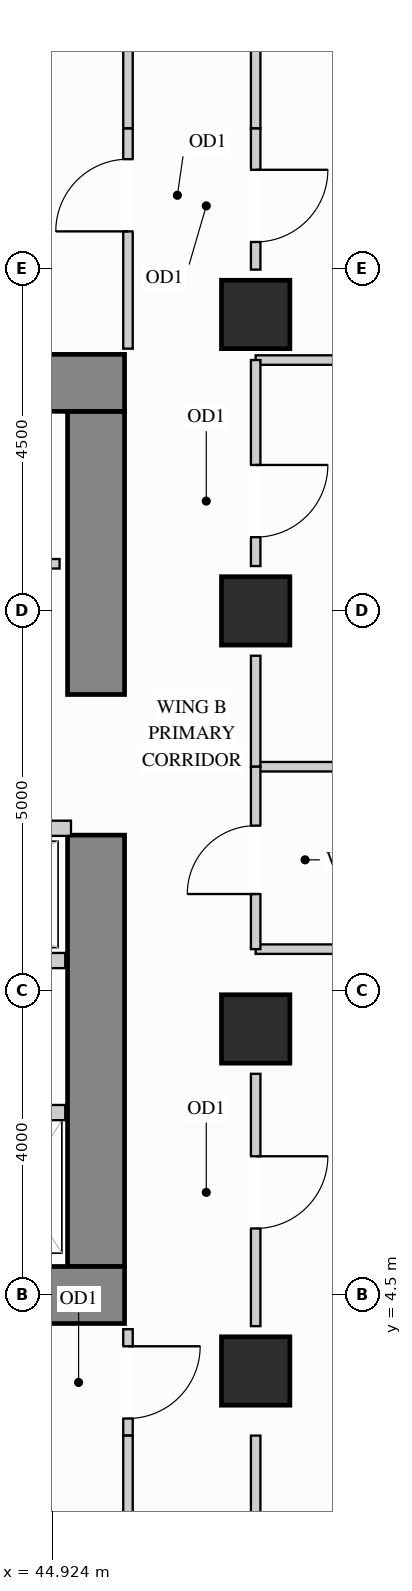
"""IFC4 building model, lengths in metres.
Left out: names, types, materials, properties, quantities, classifications, styles, units other than length and angle.
Written with IfcOpenShell. Run it as: python <this file> out.ifc"""

import sys

from ifc_helpers import new_model, si_unit, direction, frame, frame_2d, origin, origin_2d, place, context, subcontext, project, spatial, rectangle, extrude, source, transform, mapped, element, fill, save


model = new_model("IFC4")
c1 = context("Model", 3, precision=1e-05, world=origin(), true_north=direction((0.0, 1.0)))
c2 = subcontext(c1, "Body", "Model", "MODEL_VIEW")
j1 = project(units=[si_unit("LENGTHUNIT", "METRE"), si_unit("PLANEANGLEUNIT", "RADIAN")], contexts=[c1])
p1 = place(None, origin())
s1 = spatial("IfcSite", under=j1, at=p1, CompositionType="ELEMENT")
p2 = place(p1, origin())
s2 = spatial("IfcBuilding", under=s1, at=p2, CompositionType="ELEMENT")
p3 = place(p2, frame((0.0, 0.0, 124.2)))
s3 = spatial("IfcBuildingStorey", under=s2, at=p3, CompositionType="ELEMENT", Elevation=124.2)
m1 = source(origin(), c2, "Body", "SweptSolid", [
    extrude(rectangle(XDim=0.9, YDim=0.9, at=origin_2d()), origin(), (0.0, 0.0, 1.0), 3.38),
])
for number, where, z_axis, x_axis in (
    (1, (47.6, 13.5, 0.0), (0.0, 0.0, 1.0), (1.0, 0.0, 0.0)),
    (2, (47.6, 3.5, 0.0), (0.0, 0.0, 1.0), (1.0, 0.0, 0.0)),
    (3, (47.6, 8.0, 0.0), (0.0, 0.0, 1.0), (1.0, 0.0, 0.0)),
    (4, (47.6, 17.4, 0.0), (0.0, 0.0, 1.0), (1.0, 0.0, 0.0)),
):
    element("IfcColumn", number, at=place(p3, frame(where, z_axis=z_axis, x_axis=x_axis)), inside=s3, PredefinedType="COLUMN", context=c2, shape_type="MappedRepresentation", body=[
        mapped(m1, transform((0.0, 0.0, 0.0), x_axis=(1.0, 0.0, 0.0), y_axis=(0.0, 1.0, 0.0), z_axis=(0.0, 0.0, 1.0))),
    ])
m2 = source(origin(), c2, "Body", "SweptSolid", [
    extrude(rectangle(XDim=5.675, YDim=0.75, at=frame_2d((2.837, 0.0))), origin(), (0.0, 0.0, 1.0), 3.38),
])
p4 = place(p3, frame((45.5, 4.875, 0.0), z_axis=(0.0, 0.0, 1.0), x_axis=(0.0, 1.0, 0.0)))
e5 = element("IfcWall", 5, at=p4, inside=s3, PredefinedType="SHEAR", context=c2, shape_type="MappedRepresentation", body=[
    mapped(m2, transform((0.0, 0.0, 0.0), x_axis=(1.0, 0.0, 0.0), y_axis=(0.0, 1.0, 0.0), z_axis=(0.0, 0.0, 1.0))),
])
m3 = source(origin(), c2, "Body", "SweptSolid", [
    extrude(rectangle(XDim=3.725, YDim=0.75, at=frame_2d((1.863, 0.0))), origin(), (0.0, 0.0, 1.0), 3.38),
])
p5 = place(p3, frame((45.5, 12.4, 0.0), z_axis=(0.0, 0.0, 1.0), x_axis=(0.0, 1.0, 0.0)))
e6 = element("IfcWall", 6, at=p5, inside=s3, PredefinedType="SHEAR", context=c2, shape_type="MappedRepresentation", body=[
    mapped(m3, transform((0.0, 0.0, 0.0), x_axis=(1.0, 0.0, 0.0), y_axis=(0.0, 1.0, 0.0), z_axis=(0.0, 0.0, 1.0))),
])
m4 = source(origin(), c2, "Body", "SweptSolid", [
    extrude(rectangle(XDim=10.25, YDim=0.75, at=frame_2d((5.125, 0.0))), origin(), (0.0, 0.0, 1.0), 3.38),
])
for number, where, z_axis, x_axis in (
    (7, (35.625, 16.5, 0.0), (0.0, 0.0, 1.0), (1.0, 0.0, 0.0)),
    (8, (35.625, 4.5, 0.0), (0.0, 0.0, 1.0), (1.0, 0.0, 0.0)),
):
    element("IfcWall", number, at=place(p3, frame(where, z_axis=z_axis, x_axis=x_axis)), inside=s3, PredefinedType="SHEAR", context=c2, shape_type="MappedRepresentation", body=[
        mapped(m4, transform((0.0, 0.0, 0.0), x_axis=(1.0, 0.0, 0.0), y_axis=(0.0, 1.0, 0.0), z_axis=(0.0, 0.0, 1.0))),
    ])
p6 = place(p3, frame((36.5, 14.12, 0.0), z_axis=(0.0, 0.0, 1.0), x_axis=(1.0, 0.0, 0.0)))
e9 = element("IfcWall", 9, at=p6, inside=s3, PredefinedType="PARTITIONING", context=c2, shape_type="SweptSolid", body=[
    extrude(rectangle(XDim=8.52, YDim=0.125, at=frame_2d((4.26, 0.0))), origin(), (0.0, 0.0, 1.0), 3.365),
])
p7 = place(p6, frame((3.785, 0.0, 0.0)))
e10 = element("IfcOpeningElement", 10, at=p7, cuts=e9, PredefinedType="OPENING", context=c2, shape_type="SweptSolid", body=[
    extrude(rectangle(XDim=0.95, YDim=2.15, at=frame_2d((0.475, 1.075))), frame((0.0, 0.073, 0.0), z_axis=(0.0, -1.0, 0.0), x_axis=(1.0, 0.0, 0.0)), (0.0, 0.0, 1.0), 0.145),
])
m5 = source(origin(), c2, "Body", "SweptSolid", [
    extrude(rectangle(XDim=8.048, YDim=0.125, at=frame_2d((4.024, 0.0))), origin(), (0.0, 0.0, 1.0), 3.365),
])
for number, where, z_axis, x_axis in (
    (11, (47.6, 11.45, 0.0), (0.0, 0.0, 1.0), (1.0, 0.0, 0.0)),
    (12, (47.6, 16.8, 0.0), (0.0, 0.0, 1.0), (1.0, 0.0, 0.0)),
    (13, (47.6, 9.05, 0.0), (0.0, 0.0, 1.0), (1.0, 0.0, 0.0)),
):
    element("IfcWall", number, at=place(p3, frame(where, z_axis=z_axis, x_axis=x_axis)), inside=s3, PredefinedType="PARTITIONING", context=c2, shape_type="MappedRepresentation", body=[
        mapped(m5, transform((0.0, 0.0, 0.0), x_axis=(1.0, 0.0, 0.0), y_axis=(0.0, 1.0, 0.0), z_axis=(0.0, 0.0, 1.0))),
    ])
p8 = place(p3, frame((47.6, 4.09, 0.0), z_axis=(0.0, 0.0, 1.0), x_axis=(0.0, 1.0, 0.0)))
e14 = element("IfcWall", 14, at=p8, inside=s3, PredefinedType="PARTITIONING", context=c2, shape_type="SweptSolid", body=[
    extrude(rectangle(XDim=3.32, YDim=0.125, at=frame_2d((1.66, 0.0))), origin(), (0.0, 0.0, 1.0), 2.677),
])
p9 = place(p8, frame((1.285, 0.0, 0.0)))
e15 = element("IfcOpeningElement", 15, at=p9, cuts=e14, PredefinedType="OPENING", context=c2, shape_type="SweptSolid", body=[
    extrude(rectangle(XDim=0.95, YDim=2.15, at=frame_2d((0.475, 1.075))), frame((0.0, 0.073, 0.0), z_axis=(0.0, -1.0, 0.0), x_axis=(1.0, 0.0, 0.0)), (0.0, 0.0, 1.0), 0.145),
])
m6 = source(origin(), c2, "Body", "SweptSolid", [
    extrude(rectangle(XDim=1.46, YDim=0.125, at=frame_2d((0.73, 0.0))), origin(), (0.0, 0.0, 1.0), 2.677),
])
for number, where, z_axis, x_axis in (
    (16, (47.6, 1.19, 0.0), (0.0, 0.0, 1.0), (0.0, 1.0, 0.0)),
    (17, (47.6, 11.45, 0.0), (0.0, 0.0, 1.0), (0.0, 1.0, 0.0)),
):
    element("IfcWall", number, at=place(p3, frame(where, z_axis=z_axis, x_axis=x_axis)), inside=s3, PredefinedType="PARTITIONING", context=c2, shape_type="MappedRepresentation", body=[
        mapped(m6, transform((0.0, 0.0, 0.0), x_axis=(1.0, 0.0, 0.0), y_axis=(0.0, 1.0, 0.0), z_axis=(0.0, 0.0, 1.0))),
    ])
p10 = place(p3, frame((47.6, 14.09, 0.0), z_axis=(0.0, 0.0, 1.0), x_axis=(0.0, 1.0, 0.0)))
e18 = element("IfcWall", 18, at=p10, inside=s3, PredefinedType="PARTITIONING", context=c2, shape_type="SweptSolid", body=[
    extrude(rectangle(XDim=2.71, YDim=0.125, at=frame_2d((1.355, 0.0))), origin(), (0.0, 0.0, 1.0), 2.677),
])
p11 = place(p10, frame((0.38, 0.0, 0.0)))
e19 = element("IfcOpeningElement", 19, at=p11, cuts=e18, PredefinedType="OPENING", context=c2, shape_type="SweptSolid", body=[
    extrude(rectangle(XDim=0.95, YDim=2.15, at=frame_2d((0.475, 1.075))), frame((0.0, 0.073, 0.0), z_axis=(0.0, -1.0, 0.0), x_axis=(1.0, 0.0, 0.0)), (0.0, 0.0, 1.0), 0.145),
])
p12 = place(p3, frame((47.6, 17.99, 0.0), z_axis=(0.0, 0.0, 1.0), x_axis=(0.0, 1.0, 0.0)))
e20 = element("IfcWall", 20, at=p12, inside=s3, PredefinedType="PARTITIONING", context=c2, shape_type="SweptSolid", body=[
    extrude(rectangle(XDim=1.86, YDim=0.125, at=frame_2d((0.93, 0.0))), origin(), (0.0, 0.0, 1.0), 2.677),
])
p13 = place(p12, frame((0.363, 0.0, 0.0)))
e21 = element("IfcOpeningElement", 21, at=p13, cuts=e20, PredefinedType="OPENING", context=c2, shape_type="SweptSolid", body=[
    extrude(rectangle(XDim=0.95, YDim=2.15, at=frame_2d((0.475, 1.075))), frame((0.0, 0.073, 0.0), z_axis=(0.0, -1.0, 0.0), x_axis=(1.0, 0.0, 0.0)), (0.0, 0.0, 1.0), 0.145),
])
p14 = place(p3, frame((47.6, 19.85, 0.0), z_axis=(0.0, 0.0, 1.0), x_axis=(0.0, 1.0, 0.0)))
e22 = element("IfcWall", 22, at=p14, inside=s3, PredefinedType="PARTITIONING", context=c2, shape_type="MappedRepresentation", body=[
    mapped(m6, transform((0.0, 0.0, 0.0), x_axis=(1.0, 0.0, 0.0), y_axis=(0.0, 1.0, 0.0), z_axis=(0.0, 0.0, 1.0))),
])
p15 = place(p3, frame((47.6, 9.05, 0.0), z_axis=(0.0, 0.0, 1.0), x_axis=(0.0, 1.0, 0.0)))
e23 = element("IfcWall", 23, at=p15, inside=s3, PredefinedType="PARTITIONING", context=c2, shape_type="SweptSolid", body=[
    extrude(rectangle(XDim=2.4, YDim=0.125, at=frame_2d((1.2, 0.0))), origin(), (0.0, 0.0, 1.0), 2.677),
])
p16 = place(p15, frame((0.725, 0.0, 0.0)))
e24 = element("IfcOpeningElement", 24, at=p16, cuts=e23, PredefinedType="OPENING", context=c2, shape_type="SweptSolid", body=[
    extrude(rectangle(XDim=0.9, YDim=2.15, at=frame_2d((0.45, 1.075))), frame((0.0, 0.073, 0.0), z_axis=(0.0, -1.0, 0.0), x_axis=(1.0, 0.0, 0.0)), (0.0, 0.0, 1.0), 0.145),
])
p17 = place(p3, frame((45.92, 16.95, 0.0), z_axis=(0.0, 0.0, 1.0), x_axis=(0.0, 1.0, 0.0)))
e25 = element("IfcWall", 25, at=p17, inside=s3, PredefinedType="PARTITIONING", context=c2, shape_type="SweptSolid", body=[
    extrude(rectangle(XDim=2.9, YDim=0.125, at=frame_2d((1.45, 0.0))), origin(), (0.0, 0.0, 1.0), 3.365),
])
p18 = place(p17, frame((1.543, 0.0, 0.0)))
e26 = element("IfcOpeningElement", 26, at=p18, cuts=e25, PredefinedType="OPENING", context=c2, shape_type="SweptSolid", body=[
    extrude(rectangle(XDim=0.95, YDim=2.15, at=frame_2d((0.475, 1.075))), frame((0.0, 0.073, 0.0), z_axis=(0.0, -1.0, 0.0), x_axis=(1.0, 0.0, 0.0)), (0.0, 0.0, 1.0), 0.145),
])
m7 = source(origin(), c2, "Body", "SweptSolid", [
    extrude(rectangle(XDim=2.298, YDim=0.125, at=frame_2d((1.149, 0.0))), origin(), (0.0, 0.0, 1.0), 3.365),
])
p19 = place(p3, frame((45.92, 19.85, 0.0), z_axis=(0.0, 0.0, 1.0), x_axis=(0.0, 1.0, 0.0)))
e27 = element("IfcWall", 27, at=p19, inside=s3, PredefinedType="PARTITIONING", context=c2, shape_type="MappedRepresentation", body=[
    mapped(m7, transform((0.0, 0.0, 0.0), x_axis=(1.0, 0.0, 0.0), y_axis=(0.0, 1.0, 0.0), z_axis=(0.0, 0.0, 1.0))),
])
p20 = place(p3, frame((45.92, 2.65, 0.0), z_axis=(0.0, 0.0, 1.0), x_axis=(0.0, 1.0, 0.0)))
e28 = element("IfcWall", 28, at=p20, inside=s3, PredefinedType="PARTITIONING", context=c2, shape_type="SweptSolid", body=[
    extrude(rectangle(XDim=1.4, YDim=0.125, at=frame_2d((0.7, 0.0))), origin(), (0.0, 0.0, 1.0), 3.365),
])
p21 = place(p20, frame((0.225, 0.0, 0.0)))
e29 = element("IfcOpeningElement", 29, at=p21, cuts=e28, PredefinedType="OPENING", context=c2, shape_type="SweptSolid", body=[
    extrude(rectangle(XDim=0.95, YDim=2.15, at=frame_2d((0.475, 1.075))), frame((0.0, 0.073, 0.0), z_axis=(0.0, -1.0, 0.0), x_axis=(1.0, 0.0, 0.0)), (0.0, 0.0, 1.0), 0.145),
])
p22 = place(p3, frame((45.92, 0.352, 0.0), z_axis=(0.0, 0.0, 1.0), x_axis=(0.0, 1.0, 0.0)))
e30 = element("IfcWall", 30, at=p22, inside=s3, PredefinedType="PARTITIONING", context=c2, shape_type="MappedRepresentation", body=[
    mapped(m7, transform((0.0, 0.0, 0.0), x_axis=(1.0, 0.0, 0.0), y_axis=(0.0, 1.0, 0.0), z_axis=(0.0, 0.0, 1.0))),
])
m8 = source(origin(), c2, "Body", "SweptSolid", [
    extrude(rectangle(XDim=1.245, YDim=0.2, at=frame_2d((0.623, 0.0))), origin(), (0.0, 0.0, 1.0), 3.365),
])
p23 = place(p3, frame((43.85, 6.9, 0.0), z_axis=(0.0, 0.0, 1.0), x_axis=(1.0, 0.0, 0.0)))
e31 = element("IfcWall", 31, at=p23, inside=s3, PredefinedType="PARTITIONING", context=c2, shape_type="MappedRepresentation", body=[
    mapped(m8, transform((0.0, 0.0, 0.0), x_axis=(1.0, 0.0, 0.0), y_axis=(0.0, 1.0, 0.0), z_axis=(0.0, 0.0, 1.0))),
])
m9 = source(origin(), c2, "Body", "SweptSolid", [
    extrude(rectangle(XDim=3.49, YDim=0.2, at=frame_2d((1.745, 0.0))), origin(), (0.0, 0.0, 1.0), 3.365),
])
p24 = place(p3, frame((41.68, 10.64, 0.0), z_axis=(0.0, 0.0, 1.0), x_axis=(1.0, 0.0, 0.0)))
e32 = element("IfcWall", 32, at=p24, inside=s3, PredefinedType="PARTITIONING", context=c2, shape_type="MappedRepresentation", body=[
    mapped(m9, transform((0.0, 0.0, 0.0), x_axis=(1.0, 0.0, 0.0), y_axis=(0.0, 1.0, 0.0), z_axis=(0.0, 0.0, 1.0))),
])
m10 = source(origin(), c2, "Body", "SweptSolid", [
    extrude(rectangle(XDim=3.415, YDim=0.2, at=frame_2d((1.708, 0.0))), origin(), (0.0, 0.0, 1.0), 3.365),
])
p25 = place(p3, frame((41.68, 8.9, 0.0), z_axis=(0.0, 0.0, 1.0), x_axis=(1.0, 0.0, 0.0)))
e33 = element("IfcWall", 33, at=p25, inside=s3, PredefinedType="PARTITIONING", context=c2, shape_type="MappedRepresentation", body=[
    mapped(m10, transform((0.0, 0.0, 0.0), x_axis=(1.0, 0.0, 0.0), y_axis=(0.0, 1.0, 0.0), z_axis=(0.0, 0.0, 1.0))),
])
m11 = source(origin(), c2, "Body", "SweptSolid", [
    extrude(rectangle(XDim=0.95, YDim=2.15, at=frame_2d((0.475, 1.075))), frame((0.0, 0.025, 0.0), z_axis=(0.0, -1.0, 0.0), x_axis=(1.0, 0.0, 0.0)), (0.0, 0.0, 1.0), 0.05),
])
p26 = place(p18, origin())
e34 = element("IfcDoor", 34, at=p26, inside=s3, OperationType="SINGLE_SWING_LEFT", PredefinedType="DOOR", context=c2, shape_type="MappedRepresentation", body=[
    mapped(m11, transform((0.0, 0.0, 0.0), x_axis=(1.0, 0.0, 0.0), y_axis=(0.0, 1.0, 0.0), z_axis=(0.0, 0.0, 1.0))),
])
fill(e26, e34)
p27 = place(p21, origin())
e35 = element("IfcDoor", 35, at=p27, inside=s3, OperationType="SINGLE_SWING_RIGHT", PredefinedType="DOOR", context=c2, shape_type="MappedRepresentation", body=[
    mapped(m11, transform((0.0, 0.0, 0.0), x_axis=(1.0, 0.0, 0.0), y_axis=(0.0, 1.0, 0.0), z_axis=(0.0, 0.0, 1.0))),
])
fill(e29, e35)
p28 = place(p9, origin())
e36 = element("IfcDoor", 36, at=p28, inside=s3, OperationType="SINGLE_SWING_RIGHT", PredefinedType="DOOR", context=c2, shape_type="MappedRepresentation", body=[
    mapped(m11, transform((0.0, 0.0, 0.0), x_axis=(1.0, 0.0, 0.0), y_axis=(0.0, 1.0, 0.0), z_axis=(0.0, 0.0, 1.0))),
])
fill(e15, e36)
p29 = place(p11, origin())
e37 = element("IfcDoor", 37, at=p29, inside=s3, OperationType="SINGLE_SWING_RIGHT", PredefinedType="DOOR", context=c2, shape_type="MappedRepresentation", body=[
    mapped(m11, transform((0.0, 0.0, 0.0), x_axis=(1.0, 0.0, 0.0), y_axis=(0.0, 1.0, 0.0), z_axis=(0.0, 0.0, 1.0))),
])
fill(e19, e37)
p30 = place(p13, origin())
e38 = element("IfcDoor", 38, at=p30, inside=s3, OperationType="SINGLE_SWING_RIGHT", PredefinedType="DOOR", context=c2, shape_type="MappedRepresentation", body=[
    mapped(m11, transform((0.0, 0.0, 0.0), x_axis=(1.0, 0.0, 0.0), y_axis=(0.0, 1.0, 0.0), z_axis=(0.0, 0.0, 1.0))),
])
fill(e21, e38)
m12 = source(origin(), c2, "Body", "SweptSolid", [
    extrude(rectangle(XDim=0.9, YDim=2.15, at=frame_2d((0.45, 1.075))), frame((0.0, 0.025, 0.0), z_axis=(0.0, -1.0, 0.0), x_axis=(1.0, 0.0, 0.0)), (0.0, 0.0, 1.0), 0.05),
])
p31 = place(p16, origin())
e39 = element("IfcDoor", 39, at=p31, inside=s3, OperationType="SINGLE_SWING_LEFT", PredefinedType="DOOR", context=c2, shape_type="MappedRepresentation", body=[
    mapped(m12, transform((0.0, 0.0, 0.0), x_axis=(1.0, 0.0, 0.0), y_axis=(0.0, 1.0, 0.0), z_axis=(0.0, 0.0, 1.0))),
])
fill(e24, e39)
save(model, sys.argv[1])
